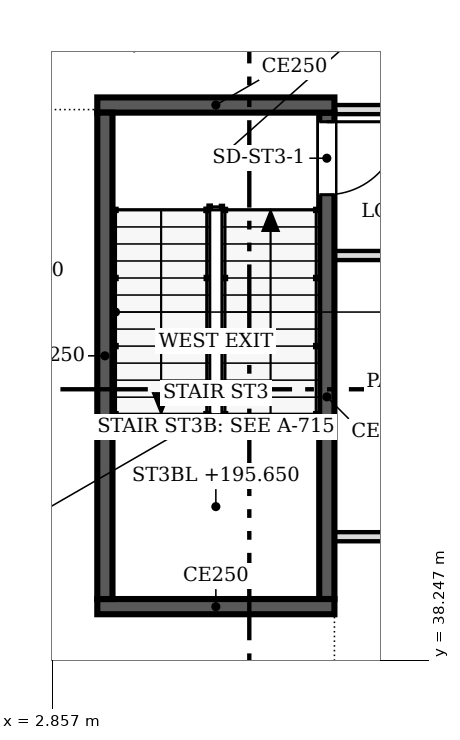
"""IFC4 building model, lengths in metres.
Left out: names, types, materials, properties, quantities, classifications, styles, units other than length and angle.
Written with IfcOpenShell. Run it as: python <this file> out.ifc"""

import sys

from ifc_helpers import new_model, si_unit, direction, frame, frame_2d, origin, place, context, subcontext, project, spatial, rectangle, extrude, source, transform, mapped, element, fill, save


model = new_model("IFC4")
c1 = context("Model", 3, precision=1e-05, world=origin(), true_north=direction((0.0, 1.0)))
c2 = subcontext(c1, "Body", "Model", "MODEL_VIEW")
j1 = project(units=[si_unit("LENGTHUNIT", "METRE"), si_unit("PLANEANGLEUNIT", "RADIAN")], contexts=[c1])
p1 = place(None, origin())
s1 = spatial("IfcSite", under=j1, at=p1, CompositionType="ELEMENT")
p2 = place(p1, origin())
s2 = spatial("IfcBuilding", under=s1, at=p2, CompositionType="ELEMENT")
p3 = place(p2, frame((0.0, 0.0, 193.4)))
s3 = spatial("IfcBuildingStorey", under=s2, at=p3, CompositionType="ELEMENT", Elevation=193.4)
p4 = place(p3, frame((7.5, 39.125, 0.0), z_axis=(0.0, 0.0, 1.0), x_axis=(-1.0, 0.0, 0.0)))
e1 = element("IfcWall", 1, at=p4, inside=s3, PredefinedType="SOLIDWALL", context=c2, shape_type="SweptSolid", body=[
    extrude(rectangle(XDim=3.9, YDim=0.25, at=frame_2d((1.95, 0.0))), origin(), (0.0, 0.0, 1.0), 4.5),
])
p5 = place(p3, frame((3.725, 39.25, 0.0), z_axis=(0.0, 0.0, 1.0), x_axis=(0.0, 1.0, 0.0)))
e2 = element("IfcWall", 2, at=p5, inside=s3, PredefinedType="SOLIDWALL", context=c2, shape_type="SweptSolid", body=[
    extrude(rectangle(XDim=8.0, YDim=0.25, at=frame_2d((4.0, 0.0))), origin(), (0.0, 0.0, 1.0), 4.5),
])
p6 = place(p3, frame((3.6, 47.375, 0.0), z_axis=(0.0, 0.0, 1.0), x_axis=(1.0, 0.0, 0.0)))
e3 = element("IfcWall", 3, at=p6, inside=s3, PredefinedType="SOLIDWALL", context=c2, shape_type="SweptSolid", body=[
    extrude(rectangle(XDim=3.9, YDim=0.25, at=frame_2d((1.95, 0.0))), origin(), (0.0, 0.0, 1.0), 4.5),
])
p7 = place(p3, frame((7.375, 47.25, 0.0), z_axis=(0.0, 0.0, 1.0), x_axis=(0.0, -1.0, 0.0)))
e4 = element("IfcWall", 4, at=p7, inside=s3, PredefinedType="SOLIDWALL", context=c2, shape_type="SweptSolid", body=[
    extrude(rectangle(XDim=8.0, YDim=0.25, at=frame_2d((4.0, 0.0))), origin(), (0.0, 0.0, 1.0), 4.5),
])
m1 = source(origin(), c2, "Body", "SweptSolid", [
    extrude(rectangle(XDim=1.2, YDim=2.1, at=frame_2d((0.6, 1.05))), frame((0.0, 0.135, 0.0), z_axis=(0.0, -1.0, 0.0), x_axis=(1.0, 0.0, 0.0)), (0.0, 0.0, 1.0), 0.27),
])
p8 = place(p7, frame((0.15, 0.0, 0.0)))
e5 = element("IfcOpeningElement", 5, at=p8, cuts=e4, PredefinedType="OPENING", context=c2, shape_type="MappedRepresentation", body=[
    mapped(m1, transform((0.0, 0.0, 0.0), scale=1.0)),
])
p9 = place(p3, frame((12.2, 40.275, 0.0), z_axis=(0.0, 0.0, 1.0), x_axis=(-1.0, 0.0, 0.0)))
e6 = element("IfcWall", 6, at=p9, inside=s3, PredefinedType="PARTITIONING", context=c2, shape_type="SweptSolid", body=[
    extrude(rectangle(XDim=4.7, YDim=0.15, at=frame_2d((2.35, 0.0))), origin(), (0.0, 0.0, 1.0), 3.767),
])
m2 = source(origin(), c2, "Body", "SweptSolid", [
    extrude(rectangle(XDim=1.0, YDim=2.1, at=frame_2d((0.5, 1.05))), frame((0.0, 0.085, 0.0), z_axis=(0.0, -1.0, 0.0), x_axis=(1.0, 0.0, 0.0)), (0.0, 0.0, 1.0), 0.17),
])
p10 = place(p9, frame((1.9, 0.0, 0.0)))
e7 = element("IfcOpeningElement", 7, at=p10, cuts=e6, PredefinedType="OPENING", context=c2, shape_type="MappedRepresentation", body=[
    mapped(m2, transform((0.0, 0.0, 0.0), scale=1.0)),
])
p11 = place(p3, frame((28.1, 44.9, 0.0), z_axis=(0.0, 0.0, 1.0), x_axis=(-1.0, 0.0, 0.0)))
e8 = element("IfcWall", 8, at=p11, inside=s3, PredefinedType="PARTITIONING", context=c2, shape_type="SweptSolid", body=[
    extrude(rectangle(XDim=20.6, YDim=0.15, at=frame_2d((10.3, 0.0))), origin(), (0.0, 0.0, 1.0), 3.767),
])
m3 = source(origin(), c2, "Body", "SweptSolid", [
    extrude(rectangle(XDim=0.9, YDim=2.1, at=frame_2d((0.45, 1.05))), frame((0.0, 0.085, 0.0), z_axis=(0.0, -1.0, 0.0), x_axis=(1.0, 0.0, 0.0)), (0.0, 0.0, 1.0), 0.17),
])
p12 = place(p11, frame((16.299, 0.0, 0.0)))
e9 = element("IfcOpeningElement", 9, at=p12, cuts=e8, PredefinedType="OPENING", context=c2, shape_type="MappedRepresentation", body=[
    mapped(m3, transform((0.0, 0.0, 0.0), scale=1.0)),
])
p13 = place(p3, frame((7.5, 47.3, 0.0), z_axis=(0.0, 0.0, 1.0), x_axis=(1.0, 0.0, 0.0)))
e10 = element("IfcWall", 10, at=p13, inside=s3, PredefinedType="PARTITIONING", context=c2, shape_type="SweptSolid", body=[
    extrude(rectangle(XDim=20.6, YDim=0.15, at=frame_2d((10.3, 0.0))), origin(), (0.0, 0.0, 1.0), 3.767),
])
m4 = source(origin(), c2, "Body", "SweptSolid", [
    extrude(rectangle(XDim=1.1, YDim=2.1, at=frame_2d((0.55, 1.05))), frame((0.0, 0.085, 0.0), z_axis=(0.0, -1.0, 0.0), x_axis=(1.0, 0.0, 0.0)), (0.0, 0.0, 1.0), 0.17),
])
p14 = place(p13, frame((0.9, 0.0, 0.0)))
e11 = element("IfcOpeningElement", 11, at=p14, cuts=e10, PredefinedType="OPENING", context=c2, shape_type="MappedRepresentation", body=[
    mapped(m4, transform((0.0, 0.0, 0.0), scale=1.0)),
])
m5 = source(origin(), c2, "Body", "SweptSolid", [
    extrude(rectangle(XDim=1.8, YDim=2.1, at=frame_2d((0.9, 1.05))), frame((0.0, 0.085, 0.0), z_axis=(0.0, -1.0, 0.0), x_axis=(1.0, 0.0, 0.0)), (0.0, 0.0, 1.0), 0.17),
])
p15 = place(p13, frame((10.1, 0.0, 0.0)))
e12 = element("IfcOpeningElement", 12, at=p15, cuts=e10, PredefinedType="OPENING", context=c2, shape_type="MappedRepresentation", body=[
    mapped(m5, transform((0.0, 0.0, 0.0), scale=1.0)),
])
p16 = place(p13, frame((17.3, 0.0, 0.0)))
e13 = element("IfcOpeningElement", 13, at=p16, cuts=e10, PredefinedType="OPENING", context=c2, shape_type="MappedRepresentation", body=[
    mapped(m2, transform((0.0, 0.0, 0.0), scale=1.0)),
])
m6 = source(origin(), c2, "Body", "SweptSolid", [
    extrude(rectangle(XDim=1.2, YDim=2.1, at=frame_2d((0.6, 1.05))), frame((0.0, 0.025, 0.0), z_axis=(0.0, -1.0, 0.0), x_axis=(1.0, 0.0, 0.0)), (0.0, 0.0, 1.0), 0.05),
])
p17 = place(p8, origin())
e14 = element("IfcDoor", 14, at=p17, inside=s3, OperationType="SINGLE_SWING_LEFT", PredefinedType="DOOR", context=c2, shape_type="MappedRepresentation", body=[
    mapped(m6, transform((0.0, 0.0, 0.0), scale=1.0)),
])
fill(e5, e14)
save(model, sys.argv[1])
